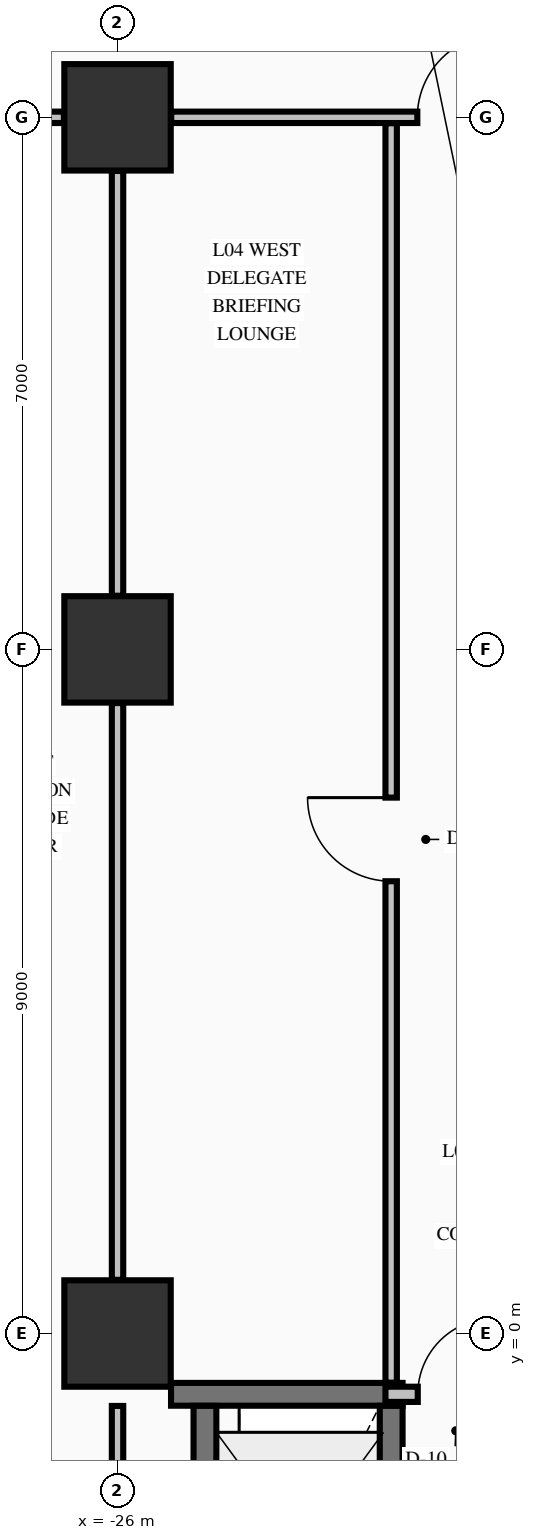
"""IFC4 building model, lengths in metres.
Left out: names, types, materials, properties, quantities, classifications, styles, units other than length and angle.
Written with IfcOpenShell. Run it as: python <this file> out.ifc"""

import sys

from ifc_helpers import new_model, si_unit, direction, frame, frame_2d, origin, origin_2d, place, context, subcontext, project, spatial, rectangle, extrude, element, fill, save


model = new_model("IFC4")
c1 = context("Model", 3, precision=1e-05, world=origin(), true_north=direction((0.0, 1.0)))
c2 = subcontext(c1, "Body", "Model", "MODEL_VIEW")
j1 = project(units=[si_unit("LENGTHUNIT", "METRE"), si_unit("PLANEANGLEUNIT", "RADIAN")], contexts=[c1])
p1 = place(None, origin())
s1 = spatial("IfcSite", under=j1, at=p1, CompositionType="ELEMENT")
p2 = place(p1, origin())
s2 = spatial("IfcBuilding", under=s1, at=p2, CompositionType="ELEMENT")
p3 = place(p2, frame((0.0, 0.0, 21.76)))
s3 = spatial("IfcBuildingStorey", under=s2, at=p3, CompositionType="ELEMENT", Elevation=21.76)
for number, where, z_axis, x_axis in (
    (1, (-26.0, 0.0, -0.45), (0.0, 0.0, 1.0), (1.0, 0.0, 0.0)),
    (2, (-26.0, 9.0, -0.45), (0.0, 0.0, 1.0), (1.0, 0.0, 0.0)),
    (3, (-26.0, 16.0, -0.45), (0.0, 0.0, 1.0), (1.0, 0.0, 0.0)),
):
    element("IfcColumn", number, at=place(p3, frame(where, z_axis=z_axis, x_axis=x_axis)), inside=s3, PredefinedType="COLUMN", context=c2, shape_type="SweptSolid", body=[
        extrude(rectangle(XDim=1.4, YDim=1.4, at=origin_2d()), origin(), (0.0, 0.0, 1.0), 5.44),
    ])
p4 = place(p3, frame((-25.296, -0.8, 0.0), z_axis=(0.0, 0.0, 1.0), x_axis=(1.0, 0.0, 0.0)))
e4 = element("IfcWall", 4, at=p4, inside=s3, PredefinedType="SHEAR", context=c2, shape_type="SweptSolid", body=[
    extrude(rectangle(XDim=3.046, YDim=0.3, at=frame_2d((1.523, 0.0))), origin(), (0.0, 0.0, 1.0), 4.99),
])
p5 = place(p3, frame((-22.475, -0.8, 0.0), z_axis=(0.0, 0.0, 1.0), x_axis=(1.0, 0.0, 0.0)))
e5 = element("IfcWall", 5, at=p5, inside=s3, PredefinedType="PARTITIONING", context=c2, shape_type="SweptSolid", body=[
    extrude(rectangle(XDim=1.669, YDim=0.2, at=frame_2d((0.834, 0.0))), origin(), (0.0, 0.0, 1.0), 4.99),
])
p6 = place(p5, frame((0.425, 0.0, 0.0)))
e6 = element("IfcOpeningElement", 6, at=p6, cuts=e5, PredefinedType="OPENING", context=c2, shape_type="SweptSolid", body=[
    extrude(rectangle(XDim=1.0, YDim=2.15, at=frame_2d((0.5, 1.075))), frame((0.0, 0.11, 0.0), z_axis=(0.0, -1.0, 0.0), x_axis=(1.0, 0.0, 0.0)), (0.0, 0.0, 1.0), 0.22),
])
p7 = place(p3, frame((-29.294, 16.0, 0.0), z_axis=(0.0, 0.0, 1.0), x_axis=(1.0, 0.0, 0.0)))
e7 = element("IfcWall", 7, at=p7, inside=s3, PredefinedType="PARTITIONING", context=c2, shape_type="SweptSolid", body=[
    extrude(rectangle(XDim=2.588, YDim=0.15, at=frame_2d((1.294, 0.0))), origin(), (0.0, 0.0, 1.0), 3.332),
])
p8 = place(p7, frame((1.019, 0.0, 0.0)))
e8 = element("IfcOpeningElement", 8, at=p8, cuts=e7, PredefinedType="OPENING", context=c2, shape_type="SweptSolid", body=[
    extrude(rectangle(XDim=1.05, YDim=2.15, at=frame_2d((0.525, 1.075))), frame((0.0, 0.085, 0.0), z_axis=(0.0, -1.0, 0.0), x_axis=(1.0, 0.0, 0.0)), (0.0, 0.0, 1.0), 0.17),
])
p9 = place(p3, frame((-25.294, 16.0, 0.0), z_axis=(0.0, 0.0, 1.0), x_axis=(1.0, 0.0, 0.0)))
e9 = element("IfcWall", 9, at=p9, inside=s3, PredefinedType="PARTITIONING", context=c2, shape_type="SweptSolid", body=[
    extrude(rectangle(XDim=4.488, YDim=0.15, at=frame_2d((2.244, 0.0))), origin(), (0.0, 0.0, 1.0), 3.332),
])
p10 = place(p9, frame((3.238, 0.0, 0.0)))
e10 = element("IfcOpeningElement", 10, at=p10, cuts=e9, PredefinedType="OPENING", context=c2, shape_type="SweptSolid", body=[
    extrude(rectangle(XDim=1.1, YDim=2.15, at=frame_2d((0.55, 1.075))), frame((0.0, 0.085, 0.0), z_axis=(0.0, -1.0, 0.0), x_axis=(1.0, 0.0, 0.0)), (0.0, 0.0, 1.0), 0.17),
])
p11 = place(p3, frame((-24.85, -4.648, 0.0), z_axis=(0.0, 0.0, 1.0), x_axis=(0.0, 1.0, 0.0)))
e11 = element("IfcWall", 11, at=p11, inside=s3, PredefinedType="SHEAR", context=c2, shape_type="SweptSolid", body=[
    extrude(rectangle(XDim=3.696, YDim=0.3, at=frame_2d((1.848, 0.0))), origin(), (0.0, 0.0, 1.0), 4.99),
])
p12 = place(p3, frame((-22.4, -4.648, 0.0), z_axis=(0.0, 0.0, 1.0), x_axis=(0.0, 1.0, 0.0)))
e12 = element("IfcWall", 12, at=p12, inside=s3, PredefinedType="SHEAR", context=c2, shape_type="SweptSolid", body=[
    extrude(rectangle(XDim=3.696, YDim=0.3, at=frame_2d((1.848, 0.0))), origin(), (0.0, 0.0, 1.0), 4.99),
])
p13 = place(p12, frame((1.198, 0.0, 0.0)))
e13 = element("IfcOpeningElement", 13, at=p13, cuts=e12, PredefinedType="OPENING", context=c2, shape_type="SweptSolid", body=[
    extrude(rectangle(XDim=1.3, YDim=2.3, at=frame_2d((0.65, 1.15))), frame((0.0, 0.16, 0.0), z_axis=(0.0, -1.0, 0.0), x_axis=(1.0, 0.0, 0.0)), (0.0, 0.0, 1.0), 0.32),
])
p14 = place(p3, frame((-26.0, -8.294, 0.0), z_axis=(0.0, 0.0, 1.0), x_axis=(0.0, 1.0, 0.0)))
e14 = element("IfcWall", 14, at=p14, inside=s3, PredefinedType="PARTITIONING", context=c2, shape_type="SweptSolid", body=[
    extrude(rectangle(XDim=7.341, YDim=0.15, at=frame_2d((3.67, 0.0))), origin(), (0.0, 0.0, 1.0), 3.332),
])
p15 = place(p3, frame((-26.0, 0.706, 0.0), z_axis=(0.0, 0.0, 1.0), x_axis=(0.0, 1.0, 0.0)))
e15 = element("IfcWall", 15, at=p15, inside=s3, PredefinedType="PARTITIONING", context=c2, shape_type="SweptSolid", body=[
    extrude(rectangle(XDim=7.588, YDim=0.15, at=frame_2d((3.794, 0.0))), origin(), (0.0, 0.0, 1.0), 3.332),
])
p16 = place(p3, frame((-26.0, 9.706, 0.0), z_axis=(0.0, 0.0, 1.0), x_axis=(0.0, 1.0, 0.0)))
e16 = element("IfcWall", 16, at=p16, inside=s3, PredefinedType="PARTITIONING", context=c2, shape_type="SweptSolid", body=[
    extrude(rectangle(XDim=5.588, YDim=0.15, at=frame_2d((2.794, 0.0))), origin(), (0.0, 0.0, 1.0), 3.332),
])
p17 = place(p3, frame((-22.4, -0.647, 0.0), z_axis=(0.0, 0.0, 1.0), x_axis=(0.0, 1.0, 0.0)))
e17 = element("IfcWall", 17, at=p17, inside=s3, PredefinedType="PARTITIONING", context=c2, shape_type="SweptSolid", body=[
    extrude(rectangle(XDim=16.569, YDim=0.15, at=frame_2d((8.285, 0.0))), origin(), (0.0, 0.0, 1.0), 4.99),
])
p18 = place(p17, frame((6.597, 0.0, 0.0)))
e18 = element("IfcOpeningElement", 18, at=p18, cuts=e17, PredefinedType="OPENING", context=c2, shape_type="SweptSolid", body=[
    extrude(rectangle(XDim=1.1, YDim=2.15, at=frame_2d((0.55, 1.075))), frame((0.0, 0.085, 0.0), z_axis=(0.0, -1.0, 0.0), x_axis=(1.0, 0.0, 0.0)), (0.0, 0.0, 1.0), 0.17),
])
p19 = place(p6, origin())
e19 = element("IfcDoor", 19, at=p19, inside=s3, OperationType="SINGLE_SWING_RIGHT", PredefinedType="DOOR", context=c2, shape_type="SweptSolid", body=[
    extrude(rectangle(XDim=1.0, YDim=2.15, at=frame_2d((0.5, 1.075))), frame((0.0, 0.025, 0.0), z_axis=(0.0, -1.0, 0.0), x_axis=(1.0, 0.0, 0.0)), (0.0, 0.0, 1.0), 0.05),
])
fill(e6, e19)
p20 = place(p18, origin())
e20 = element("IfcDoor", 20, at=p20, inside=s3, OperationType="SINGLE_SWING_RIGHT", PredefinedType="DOOR", context=c2, shape_type="SweptSolid", body=[
    extrude(rectangle(XDim=1.1, YDim=2.15, at=frame_2d((0.55, 1.075))), frame((0.0, 0.025, 0.0), z_axis=(0.0, -1.0, 0.0), x_axis=(1.0, 0.0, 0.0)), (0.0, 0.0, 1.0), 0.05),
])
fill(e18, e20)
p21 = place(p10, origin())
e21 = element("IfcDoor", 21, at=p21, inside=s3, OperationType="SINGLE_SWING_RIGHT", PredefinedType="DOOR", context=c2, shape_type="SweptSolid", body=[
    extrude(rectangle(XDim=1.1, YDim=2.15, at=frame_2d((0.55, 1.075))), frame((0.0, 0.025, 0.0), z_axis=(0.0, -1.0, 0.0), x_axis=(1.0, 0.0, 0.0)), (0.0, 0.0, 1.0), 0.05),
])
fill(e10, e21)
save(model, sys.argv[1])
